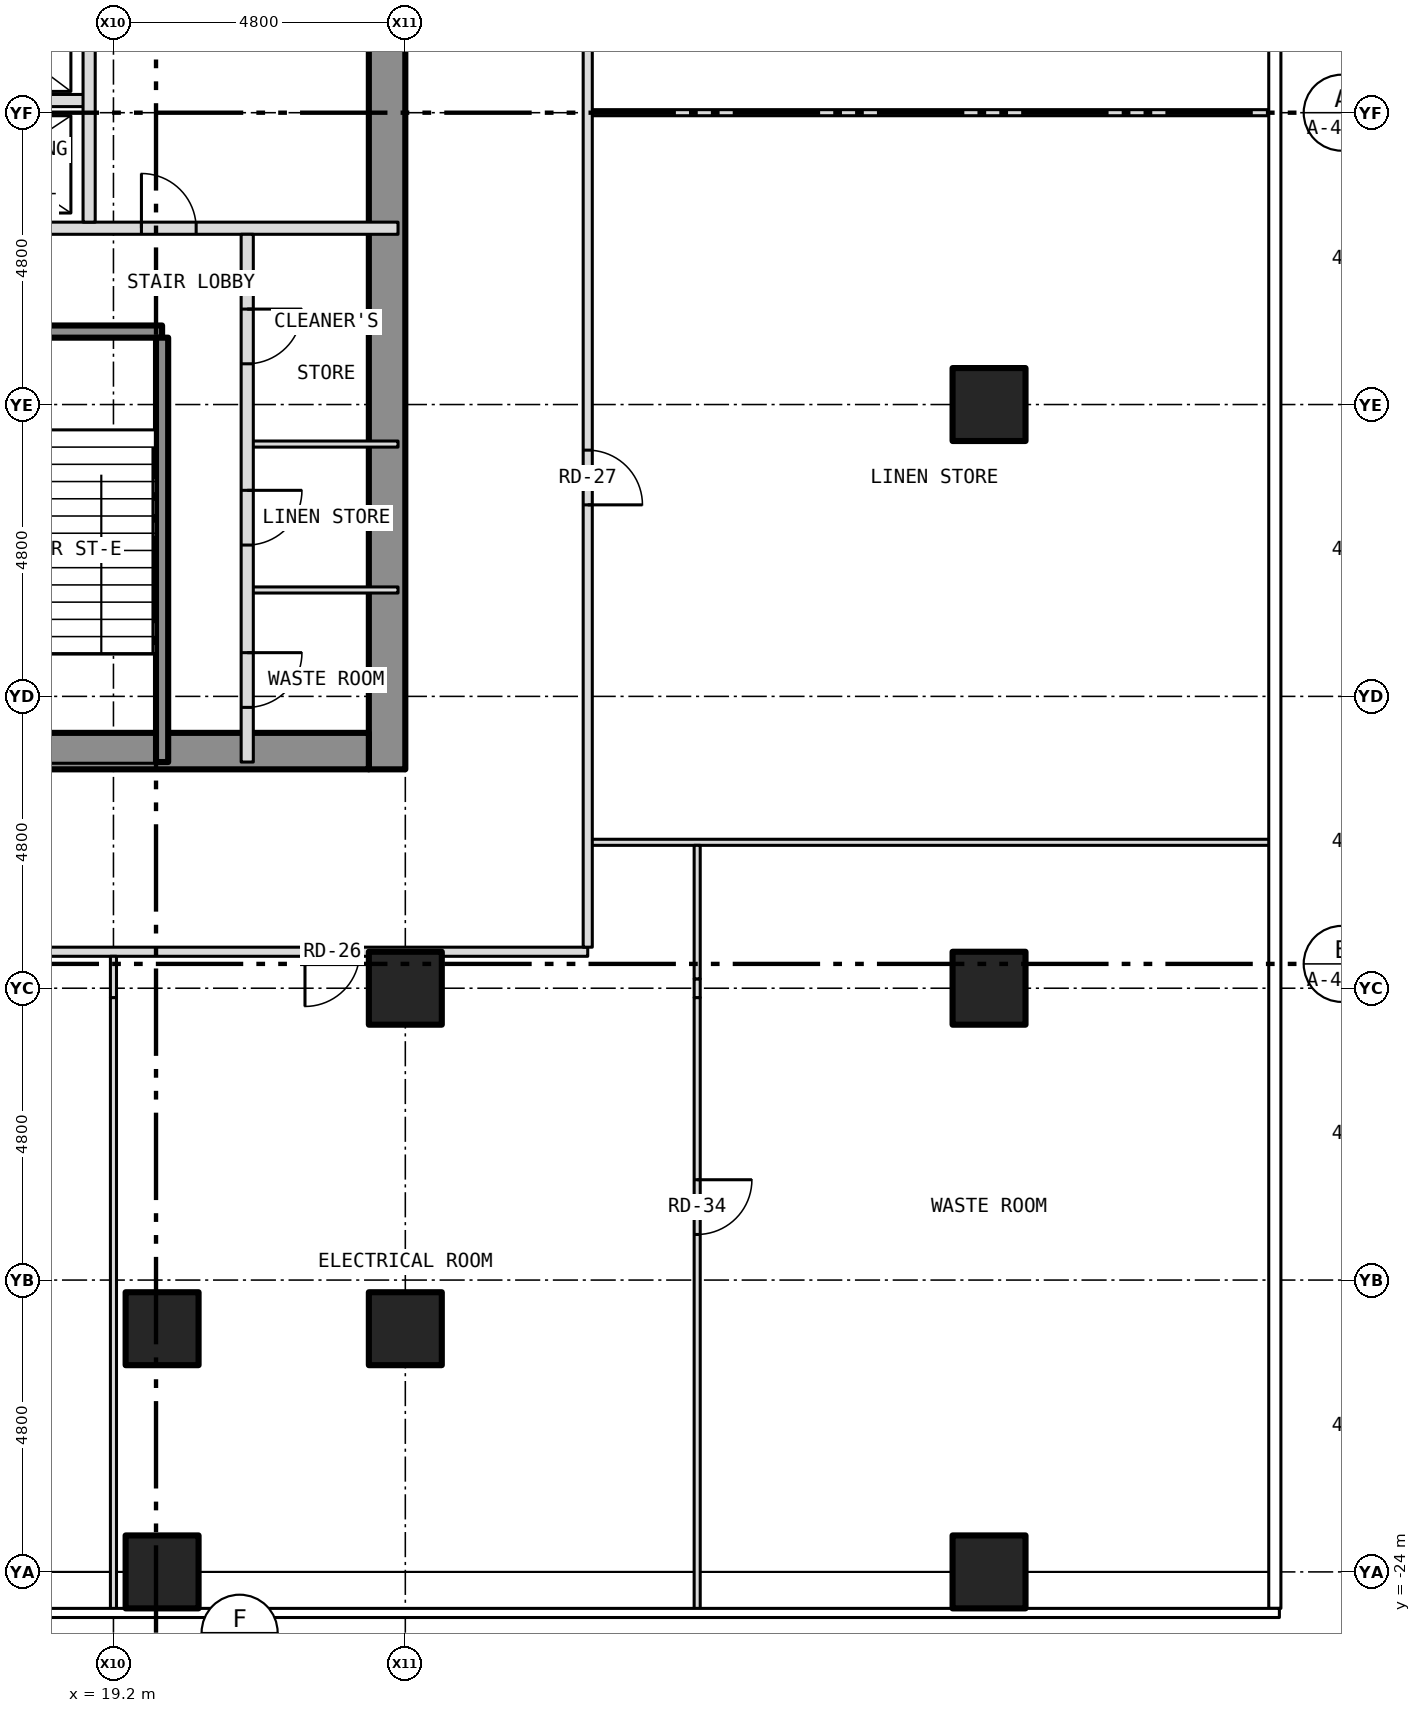
"""IFC4 building model, lengths in metres.
Left out: names, types, materials, properties, quantities, classifications, styles, units other than length and angle.
Written with IfcOpenShell. Run it as: python <this file> out.ifc"""

import sys

from ifc_helpers import new_model, si_unit, direction, frame, frame_2d, origin, origin_2d, place, context, subcontext, project, spatial, rectangle, hollow_rectangle, extrude, element, fill, save


model = new_model("IFC4")
c1 = context("Model", 3, precision=1e-05, world=origin(), true_north=direction((0.0, 1.0)))
c2 = subcontext(c1, "Body", "Model", "MODEL_VIEW")
j1 = project(units=[si_unit("LENGTHUNIT", "METRE"), si_unit("PLANEANGLEUNIT", "RADIAN")], contexts=[c1])
p1 = place(None, origin())
s1 = spatial("IfcSite", under=j1, at=p1, CompositionType="ELEMENT")
p2 = place(p1, origin())
s2 = spatial("IfcBuilding", under=s1, at=p2, CompositionType="ELEMENT")
p3 = place(p2, frame((0.0, 0.0, 20.0)))
s3 = spatial("IfcBuildingStorey", under=s2, at=p3, CompositionType="ELEMENT", Elevation=20.0)
for number, where, z_axis, x_axis in (
    (1, (20.0, -24.0, -0.2), (0.0, 0.0, 1.0), (1.0, 0.0, 0.0)),
    (2, (33.6, -24.0, -0.2), (0.0, 0.0, 1.0), (1.0, 0.0, 0.0)),
    (3, (33.6, -14.4, -0.2), (0.0, 0.0, 1.0), (1.0, 0.0, 0.0)),
    (4, (33.6, -4.8, -0.2), (0.0, 0.0, 1.0), (1.0, 0.0, 0.0)),
    (5, (20.0, -20.0, -0.2), (0.0, 0.0, 1.0), (1.0, 0.0, 0.0)),
    (6, (24.0, -20.0, -0.2), (0.0, 0.0, 1.0), (1.0, 0.0, 0.0)),
    (7, (24.0, -14.4, -0.2), (0.0, 0.0, 1.0), (1.0, 0.0, 0.0)),
):
    element("IfcColumn", number, at=place(p3, frame(where, z_axis=z_axis, x_axis=x_axis)), inside=s3, PredefinedType="COLUMN", context=c2, shape_type="SweptSolid", body=[
        extrude(hollow_rectangle(XDim=1.2, YDim=1.2, WallThickness=0.07, at=origin_2d()), origin(), (0.0, 0.0, 1.0), 4.5),
    ])
p4 = place(p3, frame((23.7, -10.8, 0.0), z_axis=(0.0, 0.0, 1.0), x_axis=(0.0, 1.0, 0.0)))
e8 = element("IfcWall", 8, at=p4, inside=s3, PredefinedType="SHEAR", context=c2, shape_type="SweptSolid", body=[
    extrude(rectangle(XDim=21.6, YDim=0.6, at=frame_2d((10.8, 0.0))), origin(), (0.0, 0.0, 1.0), 4.2),
])
p5 = place(p3, frame((16.4, -10.5, 0.0), z_axis=(0.0, 0.0, 1.0), x_axis=(1.0, 0.0, 0.0)))
e9 = element("IfcWall", 9, at=p5, inside=s3, PredefinedType="SHEAR", context=c2, shape_type="SweptSolid", body=[
    extrude(rectangle(XDim=7.0, YDim=0.6, at=frame_2d((3.5, 0.0))), origin(), (0.0, 0.0, 1.0), 4.2),
])
p6 = place(p3, frame((-27.0, -13.8, 0.0), z_axis=(0.0, 0.0, 1.0), x_axis=(1.0, 0.0, 0.0)))
e10 = element("IfcWall", 10, at=p6, inside=s3, PredefinedType="PARTITIONING", context=c2, shape_type="SweptSolid", body=[
    extrude(rectangle(XDim=54.0, YDim=0.15, at=frame_2d((27.0, 0.0))), origin(), (0.0, 0.0, 1.0), 4.3),
])
p7 = place(p6, frame((9.03, 0.0, 0.0)))
e11 = element("IfcOpeningElement", 11, at=p7, cuts=e10, PredefinedType="OPENING", context=c2, shape_type="SweptSolid", body=[
    extrude(rectangle(XDim=0.9, YDim=2.1, at=frame_2d((0.45, 1.05))), frame((0.0, 0.087, 0.0), z_axis=(0.0, -1.0, 0.0), x_axis=(1.0, 0.0, 0.0)), (0.0, 0.0, 1.0), 0.174),
])
p8 = place(p6, frame((11.08, 0.0, 0.0)))
e12 = element("IfcOpeningElement", 12, at=p8, cuts=e10, PredefinedType="OPENING", context=c2, shape_type="SweptSolid", body=[
    extrude(rectangle(XDim=0.9, YDim=2.1, at=frame_2d((0.45, 1.05))), frame((0.0, 0.087, 0.0), z_axis=(0.0, -1.0, 0.0), x_axis=(1.0, 0.0, 0.0)), (0.0, 0.0, 1.0), 0.174),
])
p9 = place(p6, frame((14.138, 0.0, 0.0)))
e13 = element("IfcOpeningElement", 13, at=p9, cuts=e10, PredefinedType="OPENING", context=c2, shape_type="SweptSolid", body=[
    extrude(rectangle(XDim=0.9, YDim=2.1, at=frame_2d((0.45, 1.05))), frame((0.0, 0.087, 0.0), z_axis=(0.0, -1.0, 0.0), x_axis=(1.0, 0.0, 0.0)), (0.0, 0.0, 1.0), 0.174),
])
p10 = place(p6, frame((22.95, 0.0, 0.0)))
e14 = element("IfcOpeningElement", 14, at=p10, cuts=e10, PredefinedType="OPENING", context=c2, shape_type="SweptSolid", body=[
    extrude(rectangle(XDim=0.9, YDim=2.1, at=frame_2d((0.45, 1.05))), frame((0.0, 0.087, 0.0), z_axis=(0.0, -1.0, 0.0), x_axis=(1.0, 0.0, 0.0)), (0.0, 0.0, 1.0), 0.174),
])
p11 = place(p6, frame((29.891, 0.0, 0.0)))
e15 = element("IfcOpeningElement", 15, at=p11, cuts=e10, PredefinedType="OPENING", context=c2, shape_type="SweptSolid", body=[
    extrude(rectangle(XDim=0.9, YDim=2.1, at=frame_2d((0.45, 1.05))), frame((0.0, 0.087, 0.0), z_axis=(0.0, -1.0, 0.0), x_axis=(1.0, 0.0, 0.0)), (0.0, 0.0, 1.0), 0.174),
])
p12 = place(p6, frame((3.75, 0.0, 0.0)))
e16 = element("IfcOpeningElement", 16, at=p12, cuts=e10, PredefinedType="OPENING", context=c2, shape_type="SweptSolid", body=[
    extrude(rectangle(XDim=0.9, YDim=2.1, at=frame_2d((0.45, 1.05))), frame((0.0, 0.087, 0.0), z_axis=(0.0, -1.0, 0.0), x_axis=(1.0, 0.0, 0.0)), (0.0, 0.0, 1.0), 0.174),
])
p13 = place(p6, frame((49.35, 0.0, 0.0)))
e17 = element("IfcOpeningElement", 17, at=p13, cuts=e10, PredefinedType="OPENING", context=c2, shape_type="SweptSolid", body=[
    extrude(rectangle(XDim=0.9, YDim=2.1, at=frame_2d((0.45, 1.05))), frame((0.0, 0.087, 0.0), z_axis=(0.0, -1.0, 0.0), x_axis=(1.0, 0.0, 0.0)), (0.0, 0.0, 1.0), 0.174),
])
p14 = place(p6, frame((42.15, 0.0, 0.0)))
e18 = element("IfcOpeningElement", 18, at=p14, cuts=e10, PredefinedType="OPENING", context=c2, shape_type="SweptSolid", body=[
    extrude(rectangle(XDim=0.9, YDim=2.1, at=frame_2d((0.45, 1.05))), frame((0.0, 0.087, 0.0), z_axis=(0.0, -1.0, 0.0), x_axis=(1.0, 0.0, 0.0)), (0.0, 0.0, 1.0), 0.174),
])
p15 = place(p6, frame((16.137, 0.0, 0.0)))
e19 = element("IfcOpeningElement", 19, at=p15, cuts=e10, PredefinedType="OPENING", context=c2, shape_type="SweptSolid", body=[
    extrude(rectangle(XDim=0.9, YDim=2.1, at=frame_2d((0.45, 1.05))), frame((0.0, 0.087, 0.0), z_axis=(0.0, -1.0, 0.0), x_axis=(1.0, 0.0, 0.0)), (0.0, 0.0, 1.0), 0.174),
])
p16 = place(p3, frame((27.0, -12.0, 0.0), z_axis=(0.0, 0.0, 1.0), x_axis=(1.0, 0.0, 0.0)))
e20 = element("IfcWall", 20, at=p16, inside=s3, PredefinedType="PARTITIONING", context=c2, shape_type="SweptSolid", body=[
    extrude(rectangle(XDim=11.28, YDim=0.1, at=frame_2d((5.64, 0.0))), origin(), (0.0, 0.0, 1.0), 4.3),
])
for number, where, z_axis, x_axis in (
    (21, (21.4, -7.85, 0.0), (0.0, 0.0, 1.0), (1.0, 0.0, 0.0)),
    (22, (21.4, -5.45, 0.0), (0.0, 0.0, 1.0), (1.0, 0.0, 0.0)),
):
    element("IfcWall", number, at=place(p3, frame(where, z_axis=z_axis, x_axis=x_axis)), inside=s3, PredefinedType="PARTITIONING", context=c2, shape_type="SweptSolid", body=[
        extrude(rectangle(XDim=2.48, YDim=0.1, at=frame_2d((1.24, 0.0))), origin(), (0.0, 0.0, 1.0), 4.2),
    ])
p17 = place(p3, frame((15.92, -3.6, 0.0), z_axis=(0.0, 0.0, 1.0), x_axis=(1.0, 0.0, 0.0)))
e23 = element("IfcWall", 23, at=p17, inside=s3, PredefinedType="SHEAR", context=c2, shape_type="SweptSolid", body=[
    extrude(rectangle(XDim=4.08, YDim=0.2, at=frame_2d((2.04, 0.0))), origin(), (0.0, 0.0, 1.0), 4.2),
])
p18 = place(p3, frame((15.92, -1.9, 0.0), z_axis=(0.0, 0.0, 1.0), x_axis=(1.0, 0.0, 0.0)))
e24 = element("IfcWall", 24, at=p18, inside=s3, PredefinedType="PARTITIONING", context=c2, shape_type="SweptSolid", body=[
    extrude(rectangle(XDim=7.96, YDim=0.2, at=frame_2d((3.98, 0.0))), origin(), (0.0, 0.0, 1.0), 4.2),
])
p19 = place(p18, frame((3.74, 0.0, 0.0)))
e25 = element("IfcOpeningElement", 25, at=p19, cuts=e24, PredefinedType="OPENING", context=c2, shape_type="SweptSolid", body=[
    extrude(rectangle(XDim=0.9, YDim=2.1, at=frame_2d((0.45, 1.05))), frame((0.0, 0.112, 0.0), z_axis=(0.0, -1.0, 0.0), x_axis=(1.0, 0.0, 0.0)), (0.0, 0.0, 1.0), 0.224),
])
p20 = place(p3, frame((27.0, 0.0, 0.0), z_axis=(0.0, 0.0, 1.0), x_axis=(1.0, 0.0, 0.0)))
e26 = element("IfcWall", 26, at=p20, inside=s3, PredefinedType="PARTITIONING", context=c2, shape_type="SweptSolid", body=[
    extrude(rectangle(XDim=11.28, YDim=0.1, at=frame_2d((5.64, 0.0))), origin(), (0.0, 0.0, 1.0), 4.3),
])
p21 = place(p3, frame((15.92, 0.2, 0.0), z_axis=(0.0, 0.0, 1.0), x_axis=(1.0, 0.0, 0.0)))
e27 = element("IfcWall", 27, at=p21, inside=s3, PredefinedType="PARTITIONING", context=c2, shape_type="SweptSolid", body=[
    extrude(rectangle(XDim=2.88, YDim=0.2, at=frame_2d((1.44, 0.0))), origin(), (0.0, 0.0, 1.0), 4.2),
])
p22 = place(p3, frame((18.8, -1.8, 0.0), z_axis=(0.0, 0.0, 1.0), x_axis=(0.0, 1.0, 0.0)))
e28 = element("IfcWall", 28, at=p22, inside=s3, PredefinedType="PARTITIONING", context=c2, shape_type="SweptSolid", body=[
    extrude(rectangle(XDim=6.15, YDim=0.2, at=frame_2d((3.075, 0.0))), origin(), (0.0, 0.0, 1.0), 4.2),
])
p23 = place(p3, frame((19.2, -24.63, 0.0), z_axis=(0.0, 0.0, 1.0), x_axis=(0.0, 1.0, 0.0)))
e29 = element("IfcWall", 29, at=p23, inside=s3, PredefinedType="PARTITIONING", context=c2, shape_type="SweptSolid", body=[
    extrude(rectangle(XDim=10.076, YDim=0.1, at=frame_2d((5.038, 0.0))), origin(), (0.0, 0.0, 1.0), 3.683),
])
p24 = place(p3, frame((19.2, -14.554, 0.0), z_axis=(0.0, 0.0, 1.0), x_axis=(0.0, 1.0, 0.0)))
e30 = element("IfcWall", 30, at=p24, inside=s3, PredefinedType="PARTITIONING", context=c2, shape_type="SweptSolid", body=[
    extrude(rectangle(XDim=0.679, YDim=0.1, at=frame_2d((0.339, 0.0))), origin(), (0.0, 0.0, 1.0), 4.3),
])
p25 = place(p3, frame((20.0, -10.68, 0.0), z_axis=(0.0, 0.0, 1.0), x_axis=(0.0, 1.0, 0.0)))
e31 = element("IfcWall", 31, at=p25, inside=s3, PredefinedType="SHEAR", context=c2, shape_type="SweptSolid", body=[
    extrude(rectangle(XDim=6.98, YDim=0.2, at=frame_2d((3.49, 0.0))), origin(), (0.0, 0.0, 1.0), 4.2),
])
p26 = place(p3, frame((21.4, -10.68, 0.0), z_axis=(0.0, 0.0, 1.0), x_axis=(0.0, 1.0, 0.0)))
e32 = element("IfcWall", 32, at=p26, inside=s3, PredefinedType="PARTITIONING", context=c2, shape_type="SweptSolid", body=[
    extrude(rectangle(XDim=8.68, YDim=0.2, at=frame_2d((4.34, 0.0))), origin(), (0.0, 0.0, 1.0), 4.2),
])
p27 = place(p26, frame((0.899, 0.0, 0.0)))
e33 = element("IfcOpeningElement", 33, at=p27, cuts=e32, PredefinedType="OPENING", context=c2, shape_type="SweptSolid", body=[
    extrude(rectangle(XDim=0.9, YDim=2.1, at=frame_2d((0.45, 1.05))), frame((0.0, 0.112, 0.0), z_axis=(0.0, -1.0, 0.0), x_axis=(1.0, 0.0, 0.0)), (0.0, 0.0, 1.0), 0.224),
])
p28 = place(p26, frame((3.569, 0.0, 0.0)))
e34 = element("IfcOpeningElement", 34, at=p28, cuts=e32, PredefinedType="OPENING", context=c2, shape_type="SweptSolid", body=[
    extrude(rectangle(XDim=0.9, YDim=2.1, at=frame_2d((0.45, 1.05))), frame((0.0, 0.112, 0.0), z_axis=(0.0, -1.0, 0.0), x_axis=(1.0, 0.0, 0.0)), (0.0, 0.0, 1.0), 0.224),
])
p29 = place(p26, frame((6.55, 0.0, 0.0)))
e35 = element("IfcOpeningElement", 35, at=p29, cuts=e32, PredefinedType="OPENING", context=c2, shape_type="SweptSolid", body=[
    extrude(rectangle(XDim=0.9, YDim=2.1, at=frame_2d((0.45, 1.05))), frame((0.0, 0.112, 0.0), z_axis=(0.0, -1.0, 0.0), x_axis=(1.0, 0.0, 0.0)), (0.0, 0.0, 1.0), 0.224),
])
p30 = place(p3, frame((27.0, -13.725, 0.0), z_axis=(0.0, 0.0, 1.0), x_axis=(0.0, 1.0, 0.0)))
e36 = element("IfcWall", 36, at=p30, inside=s3, PredefinedType="PARTITIONING", context=c2, shape_type="SweptSolid", body=[
    extrude(rectangle(XDim=27.45, YDim=0.15, at=frame_2d((13.725, 0.0))), origin(), (0.0, 0.0, 1.0), 4.3),
])
p31 = place(p30, frame((7.275, 0.0, 0.0)))
e37 = element("IfcOpeningElement", 37, at=p31, cuts=e36, PredefinedType="OPENING", context=c2, shape_type="SweptSolid", body=[
    extrude(rectangle(XDim=0.9, YDim=2.1, at=frame_2d((0.45, 1.05))), frame((0.0, 0.087, 0.0), z_axis=(0.0, -1.0, 0.0), x_axis=(1.0, 0.0, 0.0)), (0.0, 0.0, 1.0), 0.174),
])
p32 = place(p30, frame((19.275, 0.0, 0.0)))
e38 = element("IfcOpeningElement", 38, at=p32, cuts=e36, PredefinedType="OPENING", context=c2, shape_type="SweptSolid", body=[
    extrude(rectangle(XDim=0.9, YDim=2.1, at=frame_2d((0.45, 1.05))), frame((0.0, 0.087, 0.0), z_axis=(0.0, -1.0, 0.0), x_axis=(1.0, 0.0, 0.0)), (0.0, 0.0, 1.0), 0.174),
])
p33 = place(p3, frame((28.8, -24.63, 0.0), z_axis=(0.0, 0.0, 1.0), x_axis=(0.0, 1.0, 0.0)))
e39 = element("IfcWall", 39, at=p33, inside=s3, PredefinedType="PARTITIONING", context=c2, shape_type="SweptSolid", body=[
    extrude(rectangle(XDim=10.076, YDim=0.1, at=frame_2d((5.038, 0.0))), origin(), (0.0, 0.0, 1.0), 3.683),
])
p34 = place(p33, frame((6.18, 0.0, 0.0)))
e40 = element("IfcOpeningElement", 40, at=p34, cuts=e39, PredefinedType="OPENING", context=c2, shape_type="SweptSolid", body=[
    extrude(rectangle(XDim=0.9, YDim=2.1, at=frame_2d((0.45, 1.05))), frame((0.0, 0.062, 0.0), z_axis=(0.0, -1.0, 0.0), x_axis=(1.0, 0.0, 0.0)), (0.0, 0.0, 1.0), 0.124),
])
p35 = place(p3, frame((28.8, -14.554, 0.0), z_axis=(0.0, 0.0, 1.0), x_axis=(0.0, 1.0, 0.0)))
e41 = element("IfcWall", 41, at=p35, inside=s3, PredefinedType="PARTITIONING", context=c2, shape_type="SweptSolid", body=[
    extrude(rectangle(XDim=0.308, YDim=0.1, at=frame_2d((0.154, 0.0))), origin(), (0.0, 0.0, 1.0), 4.3),
])
p36 = place(p3, frame((28.8, -14.246, 0.0), z_axis=(0.0, 0.0, 1.0), x_axis=(0.0, 1.0, 0.0)))
e42 = element("IfcWall", 42, at=p36, inside=s3, PredefinedType="PARTITIONING", context=c2, shape_type="SweptSolid", body=[
    extrude(rectangle(XDim=2.196, YDim=0.1, at=frame_2d((1.098, 0.0))), origin(), (0.0, 0.0, 1.0), 3.683),
])
p37 = place(p27, origin())
e43 = element("IfcDoor", 43, at=p37, inside=s3, OperationType="SINGLE_SWING_RIGHT", PredefinedType="DOOR", context=c2, shape_type="SweptSolid", body=[
    extrude(rectangle(XDim=0.9, YDim=2.1, at=frame_2d((0.45, 1.05))), frame((0.0, 0.025, 0.0), z_axis=(0.0, -1.0, 0.0), x_axis=(1.0, 0.0, 0.0)), (0.0, 0.0, 1.0), 0.05),
])
fill(e33, e43)
p38 = place(p28, origin())
e44 = element("IfcDoor", 44, at=p38, inside=s3, OperationType="SINGLE_SWING_RIGHT", PredefinedType="DOOR", context=c2, shape_type="SweptSolid", body=[
    extrude(rectangle(XDim=0.9, YDim=2.1, at=frame_2d((0.45, 1.05))), frame((0.0, 0.025, 0.0), z_axis=(0.0, -1.0, 0.0), x_axis=(1.0, 0.0, 0.0)), (0.0, 0.0, 1.0), 0.05),
])
fill(e34, e44)
p39 = place(p29, origin())
e45 = element("IfcDoor", 45, at=p39, inside=s3, OperationType="SINGLE_SWING_RIGHT", PredefinedType="DOOR", context=c2, shape_type="SweptSolid", body=[
    extrude(rectangle(XDim=0.9, YDim=2.1, at=frame_2d((0.45, 1.05))), frame((0.0, 0.025, 0.0), z_axis=(0.0, -1.0, 0.0), x_axis=(1.0, 0.0, 0.0)), (0.0, 0.0, 1.0), 0.05),
])
fill(e35, e45)
p40 = place(p19, origin())
e46 = element("IfcDoor", 46, at=p40, inside=s3, OperationType="SINGLE_SWING_LEFT", PredefinedType="DOOR", context=c2, shape_type="SweptSolid", body=[
    extrude(rectangle(XDim=0.9, YDim=2.1, at=frame_2d((0.45, 1.05))), frame((0.0, 0.025, 0.0), z_axis=(0.0, -1.0, 0.0), x_axis=(1.0, 0.0, 0.0)), (0.0, 0.0, 1.0), 0.05),
])
fill(e25, e46)
p41 = place(p13, origin())
e47 = element("IfcDoor", 47, at=p41, inside=s3, OperationType="SINGLE_SWING_LEFT", PredefinedType="DOOR", context=c2, shape_type="SweptSolid", body=[
    extrude(rectangle(XDim=0.9, YDim=2.1, at=frame_2d((0.45, 1.05))), frame((0.0, 0.025, 0.0), z_axis=(0.0, -1.0, 0.0), x_axis=(1.0, 0.0, 0.0)), (0.0, 0.0, 1.0), 0.05),
])
fill(e17, e47)
p42 = place(p31, origin())
e48 = element("IfcDoor", 48, at=p42, inside=s3, OperationType="SINGLE_SWING_LEFT", PredefinedType="DOOR", context=c2, shape_type="SweptSolid", body=[
    extrude(rectangle(XDim=0.9, YDim=2.1, at=frame_2d((0.45, 1.05))), frame((0.0, 0.025, 0.0), z_axis=(0.0, -1.0, 0.0), x_axis=(1.0, 0.0, 0.0)), (0.0, 0.0, 1.0), 0.05),
])
fill(e37, e48)
p43 = place(p34, origin())
e49 = element("IfcDoor", 49, at=p43, inside=s3, OperationType="SINGLE_SWING_RIGHT", PredefinedType="DOOR", context=c2, shape_type="SweptSolid", body=[
    extrude(rectangle(XDim=0.9, YDim=2.1, at=frame_2d((0.45, 1.05))), frame((0.0, 0.025, 0.0), z_axis=(0.0, -1.0, 0.0), x_axis=(1.0, 0.0, 0.0)), (0.0, 0.0, 1.0), 0.05),
])
fill(e40, e49)
save(model, sys.argv[1])
